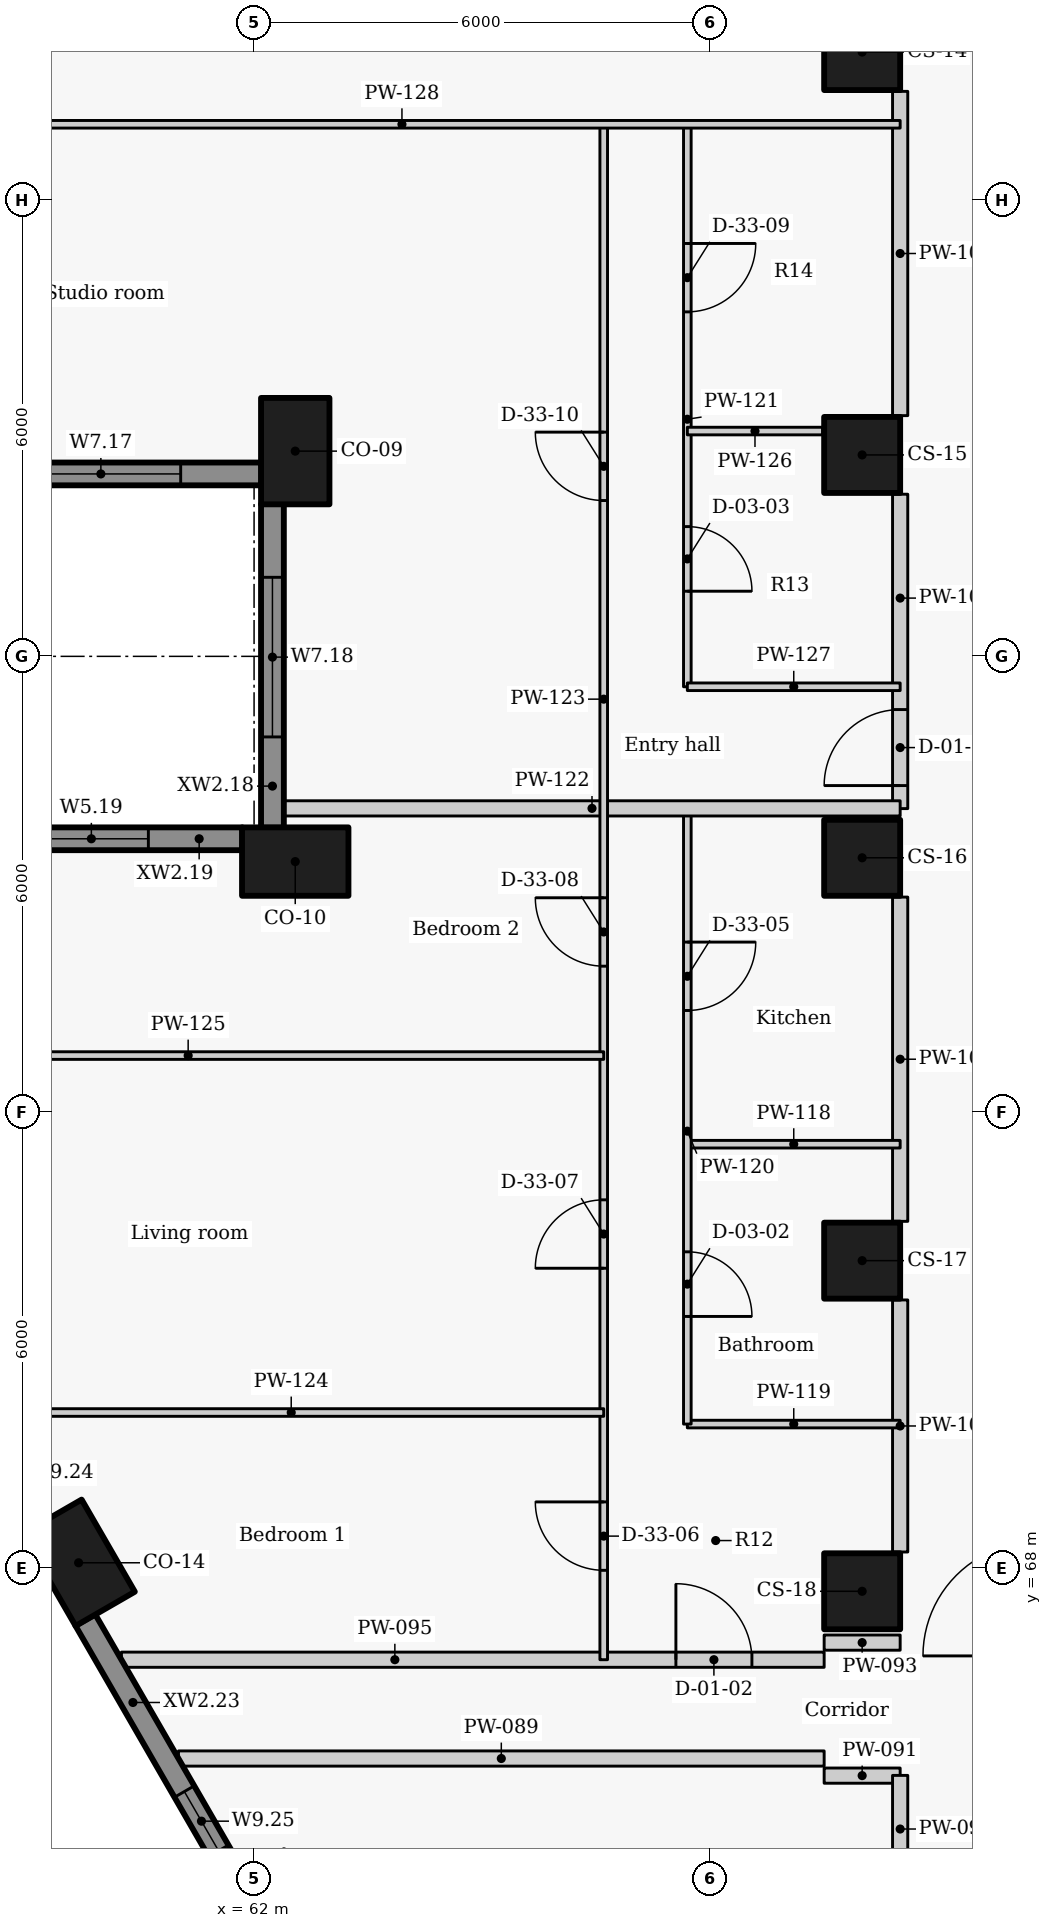
"""IFC4 building model, lengths in metres.
Left out: names, types, materials, properties, quantities, classifications, styles, units other than length and angle.
Written with IfcOpenShell. Run it as: python <this file> out.ifc"""

import sys

from ifc_helpers import new_model, si_unit, direction, frame, frame_2d, origin, origin_2d, place, context, subcontext, project, spatial, rectangle, extrude, element, fill, save


model = new_model("IFC4")
c1 = context("Model", 3, precision=1e-05, world=origin(), true_north=direction((0.0, 1.0)))
c2 = subcontext(c1, "Body", "Model", "MODEL_VIEW")
j1 = project(units=[si_unit("LENGTHUNIT", "METRE"), si_unit("PLANEANGLEUNIT", "RADIAN")], contexts=[c1])
p1 = place(None, origin())
s1 = spatial("IfcSite", under=j1, at=p1, CompositionType="ELEMENT")
p2 = place(p1, origin())
s2 = spatial("IfcBuilding", under=s1, at=p2, CompositionType="ELEMENT")
p3 = place(p2, frame((0.0, 0.0, 97.5)))
s3 = spatial("IfcBuildingStorey", under=s2, at=p3, CompositionType="ELEMENT", Elevation=97.5)
for number, where, z_axis, x_axis in (
    (1, (62.542, 82.7, 0.0), (0.0, 0.0, 1.0), (0.0, -1.0, 0.0)),
    (2, (62.542, 77.3, 0.0), (0.0, 0.0, 1.0), (-1.0, 0.0, 0.0)),
    (3, (59.692, 68.075, 0.0), (0.0, 0.0, 1.0), (0.5, -0.866, 0.0)),
):
    element("IfcColumn", number, at=place(p3, frame(where, z_axis=z_axis, x_axis=x_axis)), inside=s3, PredefinedType="COLUMN", context=c2, shape_type="SweptSolid", body=[
        extrude(rectangle(XDim=1.4, YDim=0.9, at=origin_2d()), origin(), (0.0, 0.0, 1.0), 3.3),
    ])
for number, where, z_axis, x_axis in (
    (4, (70.0, 87.95, 0.0), (0.0, 0.0, 1.0), (0.0, -1.0, 0.0)),
    (5, (70.0, 82.65, 0.0), (0.0, 0.0, 1.0), (0.0, -1.0, 0.0)),
    (6, (70.0, 77.35, 0.0), (0.0, 0.0, 1.0), (0.0, -1.0, 0.0)),
    (7, (70.0, 72.05, 0.0), (0.0, 0.0, 1.0), (0.0, -1.0, 0.0)),
    (8, (70.0, 67.7, 0.0), (0.0, 0.0, 1.0), (0.0, -1.0, 0.0)),
):
    element("IfcColumn", number, at=place(p3, frame(where, z_axis=z_axis, x_axis=x_axis)), inside=s3, PredefinedType="COLUMN", context=c2, shape_type="SweptSolid", body=[
        extrude(rectangle(XDim=1.0, YDim=1.0, at=origin_2d()), origin(), (0.0, 0.0, 1.0), 3.3),
    ])
p4 = place(p3, frame((57.873, 82.4, 0.0), z_axis=(0.0, 0.0, 1.0), x_axis=(1.0, 0.0, 0.0)))
e9 = element("IfcWall", 9, at=p4, inside=s3, PredefinedType="SOLIDWALL", context=c2, shape_type="SweptSolid", body=[
    extrude(rectangle(XDim=4.223, YDim=0.3, at=frame_2d((2.111, 0.0))), origin(), (0.0, 0.0, 1.0), 2.425),
])
p5 = place(p4, frame((1.061, 0.0, 0.9)))
e10 = element("IfcOpeningElement", 10, at=p5, cuts=e9, PredefinedType="OPENING", context=c2, shape_type="SweptSolid", body=[
    extrude(rectangle(XDim=2.1, YDim=1.1, at=frame_2d((1.05, 0.55))), frame((0.0, 0.16, 0.0), z_axis=(0.0, -1.0, 0.0), x_axis=(1.0, 0.0, 0.0)), (0.0, 0.0, 1.0), 0.32),
])
p6 = place(p3, frame((62.242, 82.004, 0.0), z_axis=(0.0, 0.0, 1.0), x_axis=(0.0, -1.0, 0.0)))
e11 = element("IfcWall", 11, at=p6, inside=s3, PredefinedType="SOLIDWALL", context=c2, shape_type="SweptSolid", body=[
    extrude(rectangle(XDim=4.258, YDim=0.3, at=frame_2d((2.129, 0.0))), origin(), (0.0, 0.0, 1.0), 2.425),
])
p7 = place(p6, frame((0.964, 0.0, 0.9)))
e12 = element("IfcOpeningElement", 12, at=p7, cuts=e11, PredefinedType="OPENING", context=c2, shape_type="SweptSolid", body=[
    extrude(rectangle(XDim=2.1, YDim=1.1, at=frame_2d((1.05, 0.55))), frame((0.0, 0.16, 0.0), z_axis=(0.0, -1.0, 0.0), x_axis=(1.0, 0.0, 0.0)), (0.0, 0.0, 1.0), 0.32),
])
p8 = place(p3, frame((61.846, 77.6, 0.0), z_axis=(0.0, 0.0, 1.0), x_axis=(-1.0, 0.0, 0.0)))
e13 = element("IfcWall", 13, at=p8, inside=s3, PredefinedType="SOLIDWALL", context=c2, shape_type="SweptSolid", body=[
    extrude(rectangle(XDim=3.973, YDim=0.3, at=frame_2d((1.986, 0.0))), origin(), (0.0, 0.0, 1.0), 2.425),
])
p9 = place(p8, frame((1.236, 0.0, 0.9)))
e14 = element("IfcOpeningElement", 14, at=p9, cuts=e13, PredefinedType="OPENING", context=c2, shape_type="SweptSolid", body=[
    extrude(rectangle(XDim=1.5, YDim=1.1, at=frame_2d((0.75, 0.55))), frame((0.0, 0.16, 0.0), z_axis=(0.0, -1.0, 0.0), x_axis=(1.0, 0.0, 0.0)), (0.0, 0.0, 1.0), 0.32),
])
p10 = place(p3, frame((59.78, 67.323, 0.0), z_axis=(0.0, 0.0, 1.0), x_axis=(0.499957037901, -0.866050206543, 0.0)))
e15 = element("IfcWall", 15, at=p10, inside=s3, PredefinedType="SOLIDWALL", context=c2, shape_type="SweptSolid", body=[
    extrude(rectangle(XDim=3.934, YDim=0.3, at=frame_2d((1.967, 0.0))), origin(), (0.0, 0.0, 1.0), 2.425),
])
p11 = place(p10, frame((2.606, 0.0, 0.9)))
e16 = element("IfcOpeningElement", 16, at=p11, cuts=e15, PredefinedType="OPENING", context=c2, shape_type="SweptSolid", body=[
    extrude(rectangle(XDim=0.9, YDim=1.1, at=frame_2d((0.45, 0.55))), frame((0.0, 0.16, 0.0), z_axis=(0.0, -1.0, 0.0), x_axis=(1.0, 0.0, 0.0)), (0.0, 0.0, 1.0), 0.32),
])
p12 = place(p3, frame((61.005, 65.5, 0.0), z_axis=(0.0, 0.0, 1.0), x_axis=(1.0, 0.0, 0.0)))
e17 = element("IfcWall", 17, at=p12, inside=s3, PredefinedType="PARTITIONING", context=c2, shape_type="SweptSolid", body=[
    extrude(rectangle(XDim=8.495, YDim=0.2, at=frame_2d((4.248, 0.0))), origin(), (0.0, 0.0, 1.0), 2.405),
])
for number, where, z_axis, x_axis in (
    (18, (69.5, 65.275, 0.0), (0.0, 0.0, 1.0), (1.0, 0.0, 0.0)),
    (19, (69.5, 67.025, 0.0), (0.0, 0.0, 1.0), (1.0, 0.0, 0.0)),
):
    element("IfcWall", number, at=place(p3, frame(where, z_axis=z_axis, x_axis=x_axis)), inside=s3, PredefinedType="PARTITIONING", context=c2, shape_type="SweptSolid", body=[
        extrude(rectangle(XDim=1.0, YDim=0.2, at=frame_2d((0.5, 0.0))), origin(), (0.0, 0.0, 1.0), 2.505),
    ])
p13 = place(p3, frame((60.255, 66.8, 0.0), z_axis=(0.0, 0.0, 1.0), x_axis=(1.0, 0.0, 0.0)))
e20 = element("IfcWall", 20, at=p13, inside=s3, PredefinedType="PARTITIONING", context=c2, shape_type="SweptSolid", body=[
    extrude(rectangle(XDim=9.245, YDim=0.2, at=frame_2d((4.623, 0.0))), origin(), (0.0, 0.0, 1.0), 2.405),
])
p14 = place(p13, frame((7.295, 0.0, 0.0)))
e21 = element("IfcOpeningElement", 21, at=p14, cuts=e20, PredefinedType="OPENING", context=c2, shape_type="SweptSolid", body=[
    extrude(rectangle(XDim=1.0, YDim=2.1, at=frame_2d((0.5, 1.05))), frame((0.0, 0.11, 0.0), z_axis=(0.0, -1.0, 0.0), x_axis=(1.0, 0.0, 0.0)), (0.0, 0.0, 1.0), 0.22),
])
p15 = place(p3, frame((70.5, 63.867, 0.0), z_axis=(0.0, 0.0, 1.0), x_axis=(0.0, 1.0, 0.0)))
e22 = element("IfcWall", 22, at=p15, inside=s3, PredefinedType="PARTITIONING", context=c2, shape_type="SweptSolid", body=[
    extrude(rectangle(XDim=1.411, YDim=0.2, at=frame_2d((0.706, 0.0))), origin(), (0.0, 0.0, 1.0), 3.025),
])
p16 = place(p3, frame((70.5, 68.217, 0.0), z_axis=(0.0, 0.0, 1.0), x_axis=(0.0, 1.0, 0.0)))
e23 = element("IfcWall", 23, at=p16, inside=s3, PredefinedType="PARTITIONING", context=c2, shape_type="SweptSolid", body=[
    extrude(rectangle(XDim=3.316, YDim=0.2, at=frame_2d((1.658, 0.0))), origin(), (0.0, 0.0, 1.0), 3.025),
])
p17 = place(p3, frame((70.5, 72.567, 0.0), z_axis=(0.0, 0.0, 1.0), x_axis=(0.0, 1.0, 0.0)))
e24 = element("IfcWall", 24, at=p17, inside=s3, PredefinedType="PARTITIONING", context=c2, shape_type="SweptSolid", body=[
    extrude(rectangle(XDim=4.266, YDim=0.2, at=frame_2d((2.133, 0.0))), origin(), (0.0, 0.0, 1.0), 3.025),
])
p18 = place(p3, frame((70.5, 77.997, 0.0), z_axis=(0.0, 0.0, 1.0), x_axis=(0.0, 1.0, 0.0)))
e25 = element("IfcWall", 25, at=p18, inside=s3, PredefinedType="PARTITIONING", context=c2, shape_type="SweptSolid", body=[
    extrude(rectangle(XDim=4.136, YDim=0.2, at=frame_2d((2.068, 0.0))), origin(), (0.0, 0.0, 1.0), 3.025),
])
p19 = place(p18, frame((0.303, 0.0, 0.0)))
e26 = element("IfcOpeningElement", 26, at=p19, cuts=e25, PredefinedType="OPENING", context=c2, shape_type="SweptSolid", body=[
    extrude(rectangle(XDim=1.0, YDim=2.1, at=frame_2d((0.5, 1.05))), frame((0.0, 0.11, 0.0), z_axis=(0.0, -1.0, 0.0), x_axis=(1.0, 0.0, 0.0)), (0.0, 0.0, 1.0), 0.22),
])
p20 = place(p3, frame((70.5, 83.167, 0.0), z_axis=(0.0, 0.0, 1.0), x_axis=(0.0, 1.0, 0.0)))
e27 = element("IfcWall", 27, at=p20, inside=s3, PredefinedType="PARTITIONING", context=c2, shape_type="SweptSolid", body=[
    extrude(rectangle(XDim=4.266, YDim=0.2, at=frame_2d((2.133, 0.0))), origin(), (0.0, 0.0, 1.0), 3.025),
])
for number, where, z_axis, x_axis in (
    (28, (67.7, 73.582, 0.0), (0.0, 0.0, 1.0), (1.0, 0.0, 0.0)),
    (29, (67.7, 69.9, 0.0), (0.0, 0.0, 1.0), (1.0, 0.0, 0.0)),
):
    element("IfcWall", number, at=place(p3, frame(where, z_axis=z_axis, x_axis=x_axis)), inside=s3, PredefinedType="PARTITIONING", context=c2, shape_type="SweptSolid", body=[
        extrude(rectangle(XDim=2.8, YDim=0.1, at=frame_2d((1.4, 0.0))), origin(), (0.0, 0.0, 1.0), 2.505),
    ])
p21 = place(p3, frame((67.7, 78.0, 0.0), z_axis=(0.0, 0.0, 1.0), x_axis=(0.0, -1.0, 0.0)))
e30 = element("IfcWall", 30, at=p21, inside=s3, PredefinedType="PARTITIONING", context=c2, shape_type="SweptSolid", body=[
    extrude(rectangle(XDim=8.1, YDim=0.1, at=frame_2d((4.05, 0.0))), origin(), (0.0, 0.0, 1.0), 3.025),
])
p22 = place(p21, frame((5.834, 0.0, 0.0)))
e31 = element("IfcOpeningElement", 31, at=p22, cuts=e30, PredefinedType="OPENING", context=c2, shape_type="SweptSolid", body=[
    extrude(rectangle(XDim=0.85, YDim=2.1, at=frame_2d((0.425, 1.05))), frame((0.0, 0.06, 0.0), z_axis=(0.0, -1.0, 0.0), x_axis=(1.0, 0.0, 0.0)), (0.0, 0.0, 1.0), 0.12),
])
p23 = place(p21, frame((1.759, 0.0, 0.0)))
e32 = element("IfcOpeningElement", 32, at=p23, cuts=e30, PredefinedType="OPENING", context=c2, shape_type="SweptSolid", body=[
    extrude(rectangle(XDim=0.9, YDim=2.1, at=frame_2d((0.45, 1.05))), frame((0.0, 0.06, 0.0), z_axis=(0.0, -1.0, 0.0), x_axis=(1.0, 0.0, 0.0)), (0.0, 0.0, 1.0), 0.12),
])
p24 = place(p3, frame((67.7, 87.0, 0.0), z_axis=(0.0, 0.0, 1.0), x_axis=(0.0, -1.0, 0.0)))
e33 = element("IfcWall", 33, at=p24, inside=s3, PredefinedType="PARTITIONING", context=c2, shape_type="SweptSolid", body=[
    extrude(rectangle(XDim=7.4, YDim=0.1, at=frame_2d((3.7, 0.0))), origin(), (0.0, 0.0, 1.0), 3.025),
])
p25 = place(p24, frame((5.293, 0.0, 0.0)))
e34 = element("IfcOpeningElement", 34, at=p25, cuts=e33, PredefinedType="OPENING", context=c2, shape_type="SweptSolid", body=[
    extrude(rectangle(XDim=0.85, YDim=2.1, at=frame_2d((0.425, 1.05))), frame((0.0, 0.06, 0.0), z_axis=(0.0, -1.0, 0.0), x_axis=(1.0, 0.0, 0.0)), (0.0, 0.0, 1.0), 0.12),
])
p26 = place(p24, frame((1.568, 0.0, 0.0)))
e35 = element("IfcOpeningElement", 35, at=p26, cuts=e33, PredefinedType="OPENING", context=c2, shape_type="SweptSolid", body=[
    extrude(rectangle(XDim=0.9, YDim=2.1, at=frame_2d((0.45, 1.05))), frame((0.0, 0.06, 0.0), z_axis=(0.0, -1.0, 0.0), x_axis=(1.0, 0.0, 0.0)), (0.0, 0.0, 1.0), 0.12),
])
p27 = place(p3, frame((62.392, 78.0, 0.0), z_axis=(0.0, 0.0, 1.0), x_axis=(1.0, 0.0, 0.0)))
e36 = element("IfcWall", 36, at=p27, inside=s3, PredefinedType="PARTITIONING", context=c2, shape_type="SweptSolid", body=[
    extrude(rectangle(XDim=8.108, YDim=0.2, at=frame_2d((4.054, 0.0))), origin(), (0.0, 0.0, 1.0), 2.405),
])
p28 = place(p3, frame((66.6, 66.8, 0.0), z_axis=(0.0, 0.0, 1.0), x_axis=(0.0, 1.0, 0.0)))
e37 = element("IfcWall", 37, at=p28, inside=s3, PredefinedType="PARTITIONING", context=c2, shape_type="SweptSolid", body=[
    extrude(rectangle(XDim=20.2, YDim=0.1, at=frame_2d((10.1, 0.0))), origin(), (0.0, 0.0, 1.0), 3.025),
])
p29 = place(p28, frame((1.176, 0.0, 0.0)))
e38 = element("IfcOpeningElement", 38, at=p29, cuts=e37, PredefinedType="OPENING", context=c2, shape_type="SweptSolid", body=[
    extrude(rectangle(XDim=0.9, YDim=2.1, at=frame_2d((0.45, 1.05))), frame((0.0, 0.06, 0.0), z_axis=(0.0, -1.0, 0.0), x_axis=(1.0, 0.0, 0.0)), (0.0, 0.0, 1.0), 0.12),
])
p30 = place(p28, frame((5.15, 0.0, 0.0)))
e39 = element("IfcOpeningElement", 39, at=p30, cuts=e37, PredefinedType="OPENING", context=c2, shape_type="SweptSolid", body=[
    extrude(rectangle(XDim=0.9, YDim=2.1, at=frame_2d((0.45, 1.05))), frame((0.0, 0.06, 0.0), z_axis=(0.0, -1.0, 0.0), x_axis=(1.0, 0.0, 0.0)), (0.0, 0.0, 1.0), 0.12),
])
p31 = place(p28, frame((9.124, 0.0, 0.0)))
e40 = element("IfcOpeningElement", 40, at=p31, cuts=e37, PredefinedType="OPENING", context=c2, shape_type="SweptSolid", body=[
    extrude(rectangle(XDim=0.9, YDim=2.1, at=frame_2d((0.45, 1.05))), frame((0.0, 0.06, 0.0), z_axis=(0.0, -1.0, 0.0), x_axis=(1.0, 0.0, 0.0)), (0.0, 0.0, 1.0), 0.12),
])
p32 = place(p28, frame((15.25, 0.0, 0.0)))
e41 = element("IfcOpeningElement", 41, at=p32, cuts=e37, PredefinedType="OPENING", context=c2, shape_type="SweptSolid", body=[
    extrude(rectangle(XDim=0.9, YDim=2.1, at=frame_2d((0.45, 1.05))), frame((0.0, 0.06, 0.0), z_axis=(0.0, -1.0, 0.0), x_axis=(1.0, 0.0, 0.0)), (0.0, 0.0, 1.0), 0.12),
])
p33 = place(p3, frame((58.377, 70.052, 0.0), z_axis=(0.0, 0.0, 1.0), x_axis=(1.0, 0.0, 0.0)))
e42 = element("IfcWall", 42, at=p33, inside=s3, PredefinedType="PARTITIONING", context=c2, shape_type="SweptSolid", body=[
    extrude(rectangle(XDim=8.223, YDim=0.1, at=frame_2d((4.111, 0.0))), origin(), (0.0, 0.0, 1.0), 2.405),
])
p34 = place(p3, frame((55.666, 74.748, 0.0), z_axis=(0.0, 0.0, 1.0), x_axis=(1.0, 0.0, 0.0)))
e43 = element("IfcWall", 43, at=p34, inside=s3, PredefinedType="PARTITIONING", context=c2, shape_type="SweptSolid", body=[
    extrude(rectangle(XDim=10.935, YDim=0.1, at=frame_2d((5.467, 0.0))), origin(), (0.0, 0.0, 1.0), 2.405),
])
p35 = place(p3, frame((67.7, 82.964, 0.0), z_axis=(0.0, 0.0, 1.0), x_axis=(1.0, 0.0, 0.0)))
e44 = element("IfcWall", 44, at=p35, inside=s3, PredefinedType="PARTITIONING", context=c2, shape_type="SweptSolid", body=[
    extrude(rectangle(XDim=1.78, YDim=0.1, at=frame_2d((0.89, 0.0))), origin(), (0.0, 0.0, 1.0), 3.025),
])
p36 = place(p3, frame((67.7, 79.6, 0.0), z_axis=(0.0, 0.0, 1.0), x_axis=(1.0, 0.0, 0.0)))
e45 = element("IfcWall", 45, at=p36, inside=s3, PredefinedType="PARTITIONING", context=c2, shape_type="SweptSolid", body=[
    extrude(rectangle(XDim=2.8, YDim=0.1, at=frame_2d((1.4, 0.0))), origin(), (0.0, 0.0, 1.0), 2.505),
])
p37 = place(p3, frame((57.391, 87.0, 0.0), z_axis=(0.0, 0.0, 1.0), x_axis=(1.0, 0.0, 0.0)))
e46 = element("IfcWall", 46, at=p37, inside=s3, PredefinedType="PARTITIONING", context=c2, shape_type="SweptSolid", body=[
    extrude(rectangle(XDim=13.109, YDim=0.1, at=frame_2d((6.555, 0.0))), origin(), (0.0, 0.0, 1.0), 2.505),
])
p38 = place(p5, origin())
e47 = element("IfcWindow", 47, at=p38, inside=s3, PartitioningType="SINGLE_PANEL", PredefinedType="WINDOW", context=c2, shape_type="SweptSolid", body=[
    extrude(rectangle(XDim=2.1, YDim=1.1, at=frame_2d((1.05, 0.55))), frame((0.0, 0.03, 0.0), z_axis=(0.0, -1.0, 0.0), x_axis=(1.0, 0.0, 0.0)), (0.0, 0.0, 1.0), 0.06),
])
fill(e10, e47)
p39 = place(p7, origin())
e48 = element("IfcWindow", 48, at=p39, inside=s3, PartitioningType="SINGLE_PANEL", PredefinedType="WINDOW", context=c2, shape_type="SweptSolid", body=[
    extrude(rectangle(XDim=2.1, YDim=1.1, at=frame_2d((1.05, 0.55))), frame((0.0, 0.03, 0.0), z_axis=(0.0, -1.0, 0.0), x_axis=(1.0, 0.0, 0.0)), (0.0, 0.0, 1.0), 0.06),
])
fill(e12, e48)
p40 = place(p9, origin())
e49 = element("IfcWindow", 49, at=p40, inside=s3, PartitioningType="SINGLE_PANEL", PredefinedType="WINDOW", context=c2, shape_type="SweptSolid", body=[
    extrude(rectangle(XDim=1.5, YDim=1.1, at=frame_2d((0.75, 0.55))), frame((0.0, 0.03, 0.0), z_axis=(0.0, -1.0, 0.0), x_axis=(1.0, 0.0, 0.0)), (0.0, 0.0, 1.0), 0.06),
])
fill(e14, e49)
p41 = place(p11, origin())
e50 = element("IfcWindow", 50, at=p41, inside=s3, PartitioningType="SINGLE_PANEL", PredefinedType="WINDOW", context=c2, shape_type="SweptSolid", body=[
    extrude(rectangle(XDim=0.9, YDim=1.1, at=frame_2d((0.45, 0.55))), frame((0.0, 0.03, 0.0), z_axis=(0.0, -1.0, 0.0), x_axis=(1.0, 0.0, 0.0)), (0.0, 0.0, 1.0), 0.06),
])
fill(e16, e50)
p42 = place(p14, origin())
e51 = element("IfcDoor", 51, at=p42, inside=s3, OperationType="SINGLE_SWING_LEFT", PredefinedType="DOOR", context=c2, shape_type="SweptSolid", body=[
    extrude(rectangle(XDim=1.0, YDim=2.1, at=frame_2d((0.5, 1.05))), frame((0.0, 0.025, 0.0), z_axis=(0.0, -1.0, 0.0), x_axis=(1.0, 0.0, 0.0)), (0.0, 0.0, 1.0), 0.05),
])
fill(e21, e51)
p43 = place(p22, origin())
e52 = element("IfcDoor", 52, at=p43, inside=s3, OperationType="SINGLE_SWING_RIGHT", PredefinedType="DOOR", context=c2, shape_type="SweptSolid", body=[
    extrude(rectangle(XDim=0.85, YDim=2.1, at=frame_2d((0.425, 1.05))), frame((0.0, 0.025, 0.0), z_axis=(0.0, -1.0, 0.0), x_axis=(1.0, 0.0, 0.0)), (0.0, 0.0, 1.0), 0.05),
])
fill(e31, e52)
p44 = place(p23, origin())
e53 = element("IfcDoor", 53, at=p44, inside=s3, OperationType="SINGLE_SWING_LEFT", PredefinedType="DOOR", context=c2, shape_type="SweptSolid", body=[
    extrude(rectangle(XDim=0.9, YDim=2.1, at=frame_2d((0.45, 1.05))), frame((0.0, 0.025, 0.0), z_axis=(0.0, -1.0, 0.0), x_axis=(1.0, 0.0, 0.0)), (0.0, 0.0, 1.0), 0.05),
])
fill(e32, e53)
p45 = place(p29, origin())
e54 = element("IfcDoor", 54, at=p45, inside=s3, OperationType="SINGLE_SWING_RIGHT", PredefinedType="DOOR", context=c2, shape_type="SweptSolid", body=[
    extrude(rectangle(XDim=0.9, YDim=2.1, at=frame_2d((0.45, 1.05))), frame((0.0, 0.025, 0.0), z_axis=(0.0, -1.0, 0.0), x_axis=(1.0, 0.0, 0.0)), (0.0, 0.0, 1.0), 0.05),
])
fill(e38, e54)
p46 = place(p30, origin())
e55 = element("IfcDoor", 55, at=p46, inside=s3, OperationType="SINGLE_SWING_LEFT", PredefinedType="DOOR", context=c2, shape_type="SweptSolid", body=[
    extrude(rectangle(XDim=0.9, YDim=2.1, at=frame_2d((0.45, 1.05))), frame((0.0, 0.025, 0.0), z_axis=(0.0, -1.0, 0.0), x_axis=(1.0, 0.0, 0.0)), (0.0, 0.0, 1.0), 0.05),
])
fill(e39, e55)
p47 = place(p31, origin())
e56 = element("IfcDoor", 56, at=p47, inside=s3, OperationType="SINGLE_SWING_RIGHT", PredefinedType="DOOR", context=c2, shape_type="SweptSolid", body=[
    extrude(rectangle(XDim=0.9, YDim=2.1, at=frame_2d((0.45, 1.05))), frame((0.0, 0.025, 0.0), z_axis=(0.0, -1.0, 0.0), x_axis=(1.0, 0.0, 0.0)), (0.0, 0.0, 1.0), 0.05),
])
fill(e40, e56)
p48 = place(p19, origin())
e57 = element("IfcDoor", 57, at=p48, inside=s3, OperationType="SINGLE_SWING_LEFT", PredefinedType="DOOR", context=c2, shape_type="SweptSolid", body=[
    extrude(rectangle(XDim=1.0, YDim=2.1, at=frame_2d((0.5, 1.05))), frame((0.0, 0.025, 0.0), z_axis=(0.0, -1.0, 0.0), x_axis=(1.0, 0.0, 0.0)), (0.0, 0.0, 1.0), 0.05),
])
fill(e26, e57)
p49 = place(p25, origin())
e58 = element("IfcDoor", 58, at=p49, inside=s3, OperationType="SINGLE_SWING_RIGHT", PredefinedType="DOOR", context=c2, shape_type="SweptSolid", body=[
    extrude(rectangle(XDim=0.85, YDim=2.1, at=frame_2d((0.425, 1.05))), frame((0.0, 0.025, 0.0), z_axis=(0.0, -1.0, 0.0), x_axis=(1.0, 0.0, 0.0)), (0.0, 0.0, 1.0), 0.05),
])
fill(e34, e58)
p50 = place(p26, origin())
e59 = element("IfcDoor", 59, at=p50, inside=s3, OperationType="SINGLE_SWING_LEFT", PredefinedType="DOOR", context=c2, shape_type="SweptSolid", body=[
    extrude(rectangle(XDim=0.9, YDim=2.1, at=frame_2d((0.45, 1.05))), frame((0.0, 0.025, 0.0), z_axis=(0.0, -1.0, 0.0), x_axis=(1.0, 0.0, 0.0)), (0.0, 0.0, 1.0), 0.05),
])
fill(e35, e59)
p51 = place(p32, origin())
e60 = element("IfcDoor", 60, at=p51, inside=s3, OperationType="SINGLE_SWING_RIGHT", PredefinedType="DOOR", context=c2, shape_type="SweptSolid", body=[
    extrude(rectangle(XDim=0.9, YDim=2.1, at=frame_2d((0.45, 1.05))), frame((0.0, 0.025, 0.0), z_axis=(0.0, -1.0, 0.0), x_axis=(1.0, 0.0, 0.0)), (0.0, 0.0, 1.0), 0.05),
])
fill(e41, e60)
save(model, sys.argv[1])
